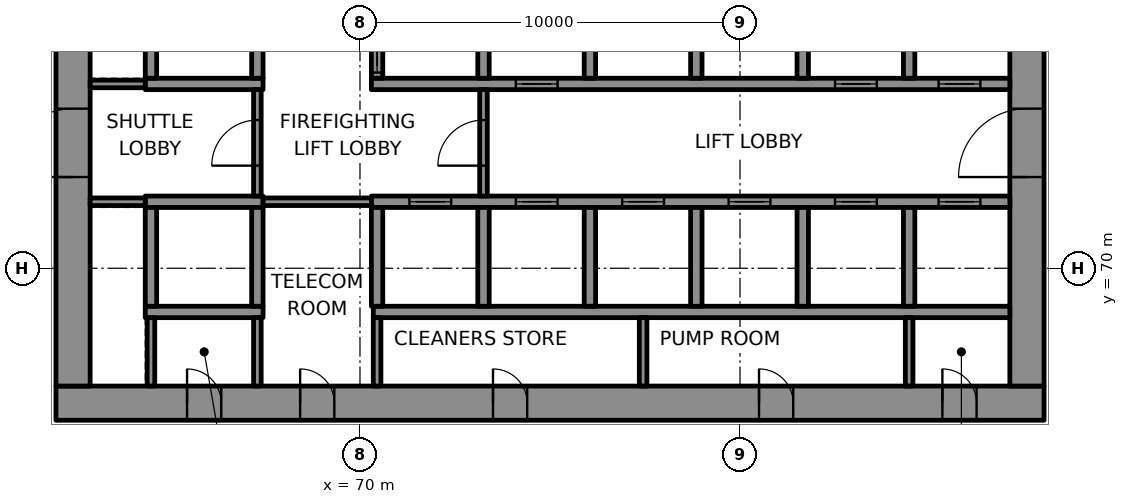
"""IFC4 building model, lengths in metres.
Left out: names, types, materials, properties, quantities, classifications, styles, units other than length and angle.
Written with IfcOpenShell. Run it as: python <this file> out.ifc"""

import sys

from ifc_helpers import new_model, si_unit, direction, frame, frame_2d, origin, place, context, subcontext, project, spatial, rectangle, extrude, element, fill, save


model = new_model("IFC4")
c1 = context("Model", 3, precision=1e-05, world=origin(), true_north=direction((0.0, 1.0)))
c2 = subcontext(c1, "Body", "Model", "MODEL_VIEW")
j1 = project(units=[si_unit("LENGTHUNIT", "METRE"), si_unit("PLANEANGLEUNIT", "RADIAN")], contexts=[c1])
p1 = place(None, origin())
s1 = spatial("IfcSite", under=j1, at=p1, CompositionType="ELEMENT")
p2 = place(p1, origin())
s2 = spatial("IfcBuilding", under=s1, at=p2, CompositionType="ELEMENT")
p3 = place(p2, frame((0.0, 0.0, 103.0)))
s3 = spatial("IfcBuildingStorey", under=s2, at=p3, CompositionType="ELEMENT", Elevation=103.0)
p4 = place(p3, frame((62.0, 66.45, 0.0), z_axis=(0.0, 0.0, 1.0), x_axis=(1.0, 0.0, 0.0)))
e1 = element("IfcWall", 1, at=p4, inside=s3, PredefinedType="SHEAR", context=c2, shape_type="SweptSolid", body=[
    extrude(rectangle(XDim=26.0, YDim=0.9, at=frame_2d((13.0, 0.0))), origin(), (0.0, 0.0, 1.0), 4.0),
])
p5 = place(p4, frame((3.45, 0.0, 0.0)))
e2 = element("IfcOpeningElement", 2, at=p5, cuts=e1, PredefinedType="OPENING", context=c2, shape_type="SweptSolid", body=[
    extrude(rectangle(XDim=0.9, YDim=2.1, at=frame_2d((0.45, 1.05))), frame((0.0, 0.46, 0.0), z_axis=(0.0, -1.0, 0.0), x_axis=(1.0, 0.0, 0.0)), (0.0, 0.0, 1.0), 0.92),
])
p6 = place(p4, frame((6.425, 0.0, 0.0)))
e3 = element("IfcOpeningElement", 3, at=p6, cuts=e1, PredefinedType="OPENING", context=c2, shape_type="SweptSolid", body=[
    extrude(rectangle(XDim=0.9, YDim=2.1, at=frame_2d((0.45, 1.05))), frame((0.0, 0.46, 0.0), z_axis=(0.0, -1.0, 0.0), x_axis=(1.0, 0.0, 0.0)), (0.0, 0.0, 1.0), 0.92),
])
p7 = place(p4, frame((11.5, 0.0, 0.0)))
e4 = element("IfcOpeningElement", 4, at=p7, cuts=e1, PredefinedType="OPENING", context=c2, shape_type="SweptSolid", body=[
    extrude(rectangle(XDim=0.9, YDim=2.1, at=frame_2d((0.45, 1.05))), frame((0.0, 0.46, 0.0), z_axis=(0.0, -1.0, 0.0), x_axis=(1.0, 0.0, 0.0)), (0.0, 0.0, 1.0), 0.92),
])
p8 = place(p4, frame((18.5, 0.0, 0.0)))
e5 = element("IfcOpeningElement", 5, at=p8, cuts=e1, PredefinedType="OPENING", context=c2, shape_type="SweptSolid", body=[
    extrude(rectangle(XDim=0.9, YDim=2.1, at=frame_2d((0.45, 1.05))), frame((0.0, 0.46, 0.0), z_axis=(0.0, -1.0, 0.0), x_axis=(1.0, 0.0, 0.0)), (0.0, 0.0, 1.0), 0.92),
])
p9 = place(p4, frame((23.325, 0.0, 0.0)))
e6 = element("IfcOpeningElement", 6, at=p9, cuts=e1, PredefinedType="OPENING", context=c2, shape_type="SweptSolid", body=[
    extrude(rectangle(XDim=0.9, YDim=2.1, at=frame_2d((0.45, 1.05))), frame((0.0, 0.46, 0.0), z_axis=(0.0, -1.0, 0.0), x_axis=(1.0, 0.0, 0.0)), (0.0, 0.0, 1.0), 0.92),
])
p10 = place(p3, frame((62.45, 66.9, 0.0), z_axis=(0.0, 0.0, 1.0), x_axis=(0.0, 1.0, 0.0)))
e7 = element("IfcWall", 7, at=p10, inside=s3, PredefinedType="SHEAR", context=c2, shape_type="SweptSolid", body=[
    extrude(rectangle(XDim=16.2, YDim=0.9, at=frame_2d((8.1, 0.0))), origin(), (0.0, 0.0, 1.0), 4.0),
])
p11 = place(p10, frame((5.5, 0.0, 0.0)))
e8 = element("IfcOpeningElement", 8, at=p11, cuts=e7, PredefinedType="OPENING", context=c2, shape_type="SweptSolid", body=[
    extrude(rectangle(XDim=1.8, YDim=2.1, at=frame_2d((0.9, 1.05))), frame((0.0, 0.46, 0.0), z_axis=(0.0, -1.0, 0.0), x_axis=(1.0, 0.0, 0.0)), (0.0, 0.0, 1.0), 0.92),
])
p12 = place(p3, frame((87.55, 66.9, 0.0), z_axis=(0.0, 0.0, 1.0), x_axis=(0.0, 1.0, 0.0)))
e9 = element("IfcWall", 9, at=p12, inside=s3, PredefinedType="SHEAR", context=c2, shape_type="SweptSolid", body=[
    extrude(rectangle(XDim=16.2, YDim=0.9, at=frame_2d((8.1, 0.0))), origin(), (0.0, 0.0, 1.0), 4.0),
])
p13 = place(p12, frame((5.5, 0.0, 0.0)))
e10 = element("IfcOpeningElement", 10, at=p13, cuts=e9, PredefinedType="OPENING", context=c2, shape_type="SweptSolid", body=[
    extrude(rectangle(XDim=1.8, YDim=2.1, at=frame_2d((0.9, 1.05))), frame((0.0, 0.46, 0.0), z_axis=(0.0, -1.0, 0.0), x_axis=(1.0, 0.0, 0.0)), (0.0, 0.0, 1.0), 0.92),
])
p14 = place(p12, frame((12.272, 0.0, 0.0)))
e11 = element("IfcOpeningElement", 11, at=p14, cuts=e9, PredefinedType="OPENING", context=c2, shape_type="SweptSolid", body=[
    extrude(rectangle(XDim=0.9, YDim=2.1, at=frame_2d((0.45, 1.05))), frame((0.0, 0.46, 0.0), z_axis=(0.0, -1.0, 0.0), x_axis=(1.0, 0.0, 0.0)), (0.0, 0.0, 1.0), 0.92),
])
p15 = place(p3, frame((64.35, 68.85, 0.0), z_axis=(0.0, 0.0, 1.0), x_axis=(1.0, 0.0, 0.0)))
e12 = element("IfcWall", 12, at=p15, inside=s3, PredefinedType="SHEAR", context=c2, shape_type="SweptSolid", body=[
    extrude(rectangle(XDim=3.1, YDim=0.3, at=frame_2d((1.55, 0.0))), origin(), (0.0, 0.0, 1.0), 4.0),
])
p16 = place(p3, frame((70.35, 68.85, 0.0), z_axis=(0.0, 0.0, 1.0), x_axis=(1.0, 0.0, 0.0)))
e13 = element("IfcWall", 13, at=p16, inside=s3, PredefinedType="SHEAR", context=c2, shape_type="SweptSolid", body=[
    extrude(rectangle(XDim=16.75, YDim=0.3, at=frame_2d((8.375, 0.0))), origin(), (0.0, 0.0, 1.0), 4.0),
])
p17 = place(p3, frame((64.35, 71.75, 0.0), z_axis=(0.0, 0.0, 1.0), x_axis=(1.0, 0.0, 0.0)))
e14 = element("IfcWall", 14, at=p17, inside=s3, PredefinedType="SHEAR", context=c2, shape_type="SweptSolid", body=[
    extrude(rectangle(XDim=3.1, YDim=0.3, at=frame_2d((1.55, 0.0))), origin(), (0.0, 0.0, 1.0), 4.0),
])
p18 = place(p3, frame((70.3, 71.75, 0.0), z_axis=(0.0, 0.0, 1.0), x_axis=(1.0, 0.0, 0.0)))
e15 = element("IfcWall", 15, at=p18, inside=s3, PredefinedType="SHEAR", context=c2, shape_type="SweptSolid", body=[
    extrude(rectangle(XDim=16.8, YDim=0.3, at=frame_2d((8.4, 0.0))), origin(), (0.0, 0.0, 1.0), 4.0),
])
p19 = place(p18, frame((1.0, 0.0, 0.0)))
e16 = element("IfcOpeningElement", 16, at=p19, cuts=e15, PredefinedType="OPENING", context=c2, shape_type="SweptSolid", body=[
    extrude(rectangle(XDim=1.1, YDim=2.1, at=frame_2d((0.55, 1.05))), frame((0.0, 0.16, 0.0), z_axis=(0.0, -1.0, 0.0), x_axis=(1.0, 0.0, 0.0)), (0.0, 0.0, 1.0), 0.32),
])
p20 = place(p18, frame((3.8, 0.0, 0.0)))
e17 = element("IfcOpeningElement", 17, at=p20, cuts=e15, PredefinedType="OPENING", context=c2, shape_type="SweptSolid", body=[
    extrude(rectangle(XDim=1.1, YDim=2.1, at=frame_2d((0.55, 1.05))), frame((0.0, 0.16, 0.0), z_axis=(0.0, -1.0, 0.0), x_axis=(1.0, 0.0, 0.0)), (0.0, 0.0, 1.0), 0.32),
])
p21 = place(p18, frame((6.6, 0.0, 0.0)))
e18 = element("IfcOpeningElement", 18, at=p21, cuts=e15, PredefinedType="OPENING", context=c2, shape_type="SweptSolid", body=[
    extrude(rectangle(XDim=1.1, YDim=2.1, at=frame_2d((0.55, 1.05))), frame((0.0, 0.16, 0.0), z_axis=(0.0, -1.0, 0.0), x_axis=(1.0, 0.0, 0.0)), (0.0, 0.0, 1.0), 0.32),
])
p22 = place(p18, frame((9.4, 0.0, 0.0)))
e19 = element("IfcOpeningElement", 19, at=p22, cuts=e15, PredefinedType="OPENING", context=c2, shape_type="SweptSolid", body=[
    extrude(rectangle(XDim=1.1, YDim=2.1, at=frame_2d((0.55, 1.05))), frame((0.0, 0.16, 0.0), z_axis=(0.0, -1.0, 0.0), x_axis=(1.0, 0.0, 0.0)), (0.0, 0.0, 1.0), 0.32),
])
p23 = place(p18, frame((12.2, 0.0, 0.0)))
e20 = element("IfcOpeningElement", 20, at=p23, cuts=e15, PredefinedType="OPENING", context=c2, shape_type="SweptSolid", body=[
    extrude(rectangle(XDim=1.1, YDim=2.1, at=frame_2d((0.55, 1.05))), frame((0.0, 0.16, 0.0), z_axis=(0.0, -1.0, 0.0), x_axis=(1.0, 0.0, 0.0)), (0.0, 0.0, 1.0), 0.32),
])
p24 = place(p18, frame((14.925, 0.0, 0.0)))
e21 = element("IfcOpeningElement", 21, at=p24, cuts=e15, PredefinedType="OPENING", context=c2, shape_type="SweptSolid", body=[
    extrude(rectangle(XDim=1.1, YDim=2.1, at=frame_2d((0.55, 1.05))), frame((0.0, 0.16, 0.0), z_axis=(0.0, -1.0, 0.0), x_axis=(1.0, 0.0, 0.0)), (0.0, 0.0, 1.0), 0.32),
])
p25 = place(p3, frame((64.35, 74.85, 0.0), z_axis=(0.0, 0.0, 1.0), x_axis=(1.0, 0.0, 0.0)))
e22 = element("IfcWall", 22, at=p25, inside=s3, PredefinedType="SHEAR", context=c2, shape_type="SweptSolid", body=[
    extrude(rectangle(XDim=3.1, YDim=0.3, at=frame_2d((1.55, 0.0))), origin(), (0.0, 0.0, 1.0), 4.0),
])
p26 = place(p3, frame((70.3, 74.85, 0.0), z_axis=(0.0, 0.0, 1.0), x_axis=(1.0, 0.0, 0.0)))
e23 = element("IfcWall", 23, at=p26, inside=s3, PredefinedType="SHEAR", context=c2, shape_type="SweptSolid", body=[
    extrude(rectangle(XDim=16.8, YDim=0.3, at=frame_2d((8.4, 0.0))), origin(), (0.0, 0.0, 1.0), 4.0),
])
p27 = place(p26, frame((3.8, 0.0, 0.0)))
e24 = element("IfcOpeningElement", 24, at=p27, cuts=e23, PredefinedType="OPENING", context=c2, shape_type="SweptSolid", body=[
    extrude(rectangle(XDim=1.1, YDim=2.1, at=frame_2d((0.55, 1.05))), frame((0.0, 0.16, 0.0), z_axis=(0.0, -1.0, 0.0), x_axis=(1.0, 0.0, 0.0)), (0.0, 0.0, 1.0), 0.32),
])
p28 = place(p26, frame((12.2, 0.0, 0.0)))
e25 = element("IfcOpeningElement", 25, at=p28, cuts=e23, PredefinedType="OPENING", context=c2, shape_type="SweptSolid", body=[
    extrude(rectangle(XDim=1.1, YDim=2.1, at=frame_2d((0.55, 1.05))), frame((0.0, 0.16, 0.0), z_axis=(0.0, -1.0, 0.0), x_axis=(1.0, 0.0, 0.0)), (0.0, 0.0, 1.0), 0.32),
])
p29 = place(p26, frame((14.925, 0.0, 0.0)))
e26 = element("IfcOpeningElement", 26, at=p29, cuts=e23, PredefinedType="OPENING", context=c2, shape_type="SweptSolid", body=[
    extrude(rectangle(XDim=1.1, YDim=2.1, at=frame_2d((0.55, 1.05))), frame((0.0, 0.16, 0.0), z_axis=(0.0, -1.0, 0.0), x_axis=(1.0, 0.0, 0.0)), (0.0, 0.0, 1.0), 0.32),
])
for number, where, z_axis, x_axis in (
    (27, (64.5, 69.0, 0.0), (0.0, 0.0, 1.0), (0.0, 1.0, 0.0)),
    (28, (64.5, 75.0, 0.0), (0.0, 0.0, 1.0), (0.0, 1.0, 0.0)),
    (29, (67.3, 69.0, 0.0), (0.0, 0.0, 1.0), (0.0, 1.0, 0.0)),
    (30, (67.3, 75.0, 0.0), (0.0, 0.0, 1.0), (0.0, 1.0, 0.0)),
    (31, (70.45, 69.0, 0.0), (0.0, 0.0, 1.0), (0.0, 1.0, 0.0)),
):
    element("IfcWall", number, at=place(p3, frame(where, z_axis=z_axis, x_axis=x_axis)), inside=s3, PredefinedType="SHEAR", context=c2, shape_type="SweptSolid", body=[
        extrude(rectangle(XDim=2.6, YDim=0.3, at=frame_2d((1.3, 0.0))), origin(), (0.0, 0.0, 1.0), 4.0),
    ])
p30 = place(p3, frame((70.45, 75.0, 0.0), z_axis=(0.0, 0.0, 1.0), x_axis=(0.0, 1.0, 0.0)))
e32 = element("IfcWall", 32, at=p30, inside=s3, PredefinedType="SHEAR", context=c2, shape_type="SweptSolid", body=[
    extrude(rectangle(XDim=2.6, YDim=0.3, at=frame_2d((1.3, 0.0))), origin(), (0.0, 0.0, 1.0), 4.0),
])
p31 = place(p30, frame((0.15, 0.0, 0.0)))
e33 = element("IfcOpeningElement", 33, at=p31, cuts=e32, PredefinedType="OPENING", context=c2, shape_type="SweptSolid", body=[
    extrude(rectangle(XDim=1.1, YDim=2.1, at=frame_2d((0.55, 1.05))), frame((0.0, 0.16, 0.0), z_axis=(0.0, -1.0, 0.0), x_axis=(1.0, 0.0, 0.0)), (0.0, 0.0, 1.0), 0.32),
])
for number, where, z_axis, x_axis in (
    (34, (73.25, 69.0, 0.0), (0.0, 0.0, 1.0), (0.0, 1.0, 0.0)),
    (35, (73.25, 75.0, 0.0), (0.0, 0.0, 1.0), (0.0, 1.0, 0.0)),
    (36, (76.05, 69.0, 0.0), (0.0, 0.0, 1.0), (0.0, 1.0, 0.0)),
    (37, (76.05, 75.0, 0.0), (0.0, 0.0, 1.0), (0.0, 1.0, 0.0)),
    (38, (78.85, 69.0, 0.0), (0.0, 0.0, 1.0), (0.0, 1.0, 0.0)),
    (39, (78.85, 75.0, 0.0), (0.0, 0.0, 1.0), (0.0, 1.0, 0.0)),
    (40, (81.65, 69.0, 0.0), (0.0, 0.0, 1.0), (0.0, 1.0, 0.0)),
    (41, (81.65, 75.0, 0.0), (0.0, 0.0, 1.0), (0.0, 1.0, 0.0)),
    (42, (84.45, 69.0, 0.0), (0.0, 0.0, 1.0), (0.0, 1.0, 0.0)),
    (43, (84.45, 75.0, 0.0), (0.0, 0.0, 1.0), (0.0, 1.0, 0.0)),
):
    element("IfcWall", number, at=place(p3, frame(where, z_axis=z_axis, x_axis=x_axis)), inside=s3, PredefinedType="SHEAR", context=c2, shape_type="SweptSolid", body=[
        extrude(rectangle(XDim=2.6, YDim=0.3, at=frame_2d((1.3, 0.0))), origin(), (0.0, 0.0, 1.0), 4.0),
    ])
p32 = place(p3, frame((62.9, 71.75, 0.0), z_axis=(0.0, 0.0, 1.0), x_axis=(1.0, 0.0, 0.0)))
e44 = element("IfcWall", 44, at=p32, inside=s3, PredefinedType="PARTITIONING", context=c2, shape_type="SweptSolid", body=[
    extrude(rectangle(XDim=1.45, YDim=0.2, at=frame_2d((0.725, 0.0))), origin(), (0.0, 0.0, 1.0), 4.0),
])
p33 = place(p3, frame((67.45, 71.75, 0.0), z_axis=(0.0, 0.0, 1.0), x_axis=(1.0, 0.0, 0.0)))
e45 = element("IfcWall", 45, at=p33, inside=s3, PredefinedType="PARTITIONING", context=c2, shape_type="SweptSolid", body=[
    extrude(rectangle(XDim=2.85, YDim=0.2, at=frame_2d((1.425, 0.0))), origin(), (0.0, 0.0, 1.0), 4.0),
])
p34 = place(p3, frame((62.9, 74.85, 0.0), z_axis=(0.0, 0.0, 1.0), x_axis=(1.0, 0.0, 0.0)))
e46 = element("IfcWall", 46, at=p34, inside=s3, PredefinedType="PARTITIONING", context=c2, shape_type="SweptSolid", body=[
    extrude(rectangle(XDim=1.45, YDim=0.2, at=frame_2d((0.725, 0.0))), origin(), (0.0, 0.0, 1.0), 4.0),
])
for number, where, z_axis, x_axis in (
    (47, (64.5, 66.9, 0.0), (0.0, 0.0, 1.0), (0.0, 1.0, 0.0)),
    (48, (67.3, 66.9, 0.0), (0.0, 0.0, 1.0), (0.0, 1.0, 0.0)),
):
    element("IfcWall", number, at=place(p3, frame(where, z_axis=z_axis, x_axis=x_axis)), inside=s3, PredefinedType="PARTITIONING", context=c2, shape_type="SweptSolid", body=[
        extrude(rectangle(XDim=1.8, YDim=0.2, at=frame_2d((0.9, 0.0))), origin(), (0.0, 0.0, 1.0), 4.0),
    ])
p35 = place(p3, frame((67.3, 71.9, 0.0), z_axis=(0.0, 0.0, 1.0), x_axis=(0.0, 1.0, 0.0)))
e49 = element("IfcWall", 49, at=p35, inside=s3, PredefinedType="PARTITIONING", context=c2, shape_type="SweptSolid", body=[
    extrude(rectangle(XDim=2.8, YDim=0.2, at=frame_2d((1.4, 0.0))), origin(), (0.0, 0.0, 1.0), 4.0),
])
p36 = place(p35, frame((0.8, 0.0, 0.0)))
e50 = element("IfcOpeningElement", 50, at=p36, cuts=e49, PredefinedType="OPENING", context=c2, shape_type="SweptSolid", body=[
    extrude(rectangle(XDim=1.2, YDim=2.1, at=frame_2d((0.6, 1.05))), frame((0.0, 0.11, 0.0), z_axis=(0.0, -1.0, 0.0), x_axis=(1.0, 0.0, 0.0)), (0.0, 0.0, 1.0), 0.22),
])
p37 = place(p3, frame((70.45, 66.9, 0.0), z_axis=(0.0, 0.0, 1.0), x_axis=(0.0, 1.0, 0.0)))
e51 = element("IfcWall", 51, at=p37, inside=s3, PredefinedType="PARTITIONING", context=c2, shape_type="SweptSolid", body=[
    extrude(rectangle(XDim=1.8, YDim=0.2, at=frame_2d((0.9, 0.0))), origin(), (0.0, 0.0, 1.0), 4.0),
])
p38 = place(p3, frame((73.25, 71.9, 0.0), z_axis=(0.0, 0.0, 1.0), x_axis=(0.0, 1.0, 0.0)))
e52 = element("IfcWall", 52, at=p38, inside=s3, PredefinedType="PARTITIONING", context=c2, shape_type="SweptSolid", body=[
    extrude(rectangle(XDim=2.8, YDim=0.2, at=frame_2d((1.4, 0.0))), origin(), (0.0, 0.0, 1.0), 4.0),
])
p39 = place(p38, frame((0.8, 0.0, 0.0)))
e53 = element("IfcOpeningElement", 53, at=p39, cuts=e52, PredefinedType="OPENING", context=c2, shape_type="SweptSolid", body=[
    extrude(rectangle(XDim=1.2, YDim=2.1, at=frame_2d((0.6, 1.05))), frame((0.0, 0.11, 0.0), z_axis=(0.0, -1.0, 0.0), x_axis=(1.0, 0.0, 0.0)), (0.0, 0.0, 1.0), 0.22),
])
for number, where, z_axis, x_axis in (
    (54, (77.45, 66.9, 0.0), (0.0, 0.0, 1.0), (0.0, 1.0, 0.0)),
    (55, (84.45, 66.9, 0.0), (0.0, 0.0, 1.0), (0.0, 1.0, 0.0)),
):
    element("IfcWall", number, at=place(p3, frame(where, z_axis=z_axis, x_axis=x_axis)), inside=s3, PredefinedType="PARTITIONING", context=c2, shape_type="SweptSolid", body=[
        extrude(rectangle(XDim=1.8, YDim=0.2, at=frame_2d((0.9, 0.0))), origin(), (0.0, 0.0, 1.0), 4.0),
    ])
p40 = place(p19, origin())
e56 = element("IfcDoor", 56, at=p40, inside=s3, OperationType="DOUBLE_DOOR_SLIDING", PredefinedType="DOOR", context=c2, shape_type="SweptSolid", body=[
    extrude(rectangle(XDim=1.1, YDim=2.1, at=frame_2d((0.55, 1.05))), frame((0.0, 0.025, 0.0), z_axis=(0.0, -1.0, 0.0), x_axis=(1.0, 0.0, 0.0)), (0.0, 0.0, 1.0), 0.05),
])
fill(e16, e56)
p41 = place(p20, origin())
e57 = element("IfcDoor", 57, at=p41, inside=s3, OperationType="DOUBLE_DOOR_SLIDING", PredefinedType="DOOR", context=c2, shape_type="SweptSolid", body=[
    extrude(rectangle(XDim=1.1, YDim=2.1, at=frame_2d((0.55, 1.05))), frame((0.0, 0.025, 0.0), z_axis=(0.0, -1.0, 0.0), x_axis=(1.0, 0.0, 0.0)), (0.0, 0.0, 1.0), 0.05),
])
fill(e17, e57)
p42 = place(p21, origin())
e58 = element("IfcDoor", 58, at=p42, inside=s3, OperationType="DOUBLE_DOOR_SLIDING", PredefinedType="DOOR", context=c2, shape_type="SweptSolid", body=[
    extrude(rectangle(XDim=1.1, YDim=2.1, at=frame_2d((0.55, 1.05))), frame((0.0, 0.025, 0.0), z_axis=(0.0, -1.0, 0.0), x_axis=(1.0, 0.0, 0.0)), (0.0, 0.0, 1.0), 0.05),
])
fill(e18, e58)
p43 = place(p22, origin())
e59 = element("IfcDoor", 59, at=p43, inside=s3, OperationType="DOUBLE_DOOR_SLIDING", PredefinedType="DOOR", context=c2, shape_type="SweptSolid", body=[
    extrude(rectangle(XDim=1.1, YDim=2.1, at=frame_2d((0.55, 1.05))), frame((0.0, 0.025, 0.0), z_axis=(0.0, -1.0, 0.0), x_axis=(1.0, 0.0, 0.0)), (0.0, 0.0, 1.0), 0.05),
])
fill(e19, e59)
p44 = place(p23, origin())
e60 = element("IfcDoor", 60, at=p44, inside=s3, OperationType="DOUBLE_DOOR_SLIDING", PredefinedType="DOOR", context=c2, shape_type="SweptSolid", body=[
    extrude(rectangle(XDim=1.1, YDim=2.1, at=frame_2d((0.55, 1.05))), frame((0.0, 0.025, 0.0), z_axis=(0.0, -1.0, 0.0), x_axis=(1.0, 0.0, 0.0)), (0.0, 0.0, 1.0), 0.05),
])
fill(e20, e60)
p45 = place(p24, origin())
e61 = element("IfcDoor", 61, at=p45, inside=s3, OperationType="DOUBLE_DOOR_SLIDING", PredefinedType="DOOR", context=c2, shape_type="SweptSolid", body=[
    extrude(rectangle(XDim=1.1, YDim=2.1, at=frame_2d((0.55, 1.05))), frame((0.0, 0.025, 0.0), z_axis=(0.0, -1.0, 0.0), x_axis=(1.0, 0.0, 0.0)), (0.0, 0.0, 1.0), 0.05),
])
fill(e21, e61)
p46 = place(p31, origin())
e62 = element("IfcDoor", 62, at=p46, inside=s3, OperationType="DOUBLE_DOOR_SLIDING", PredefinedType="DOOR", context=c2, shape_type="SweptSolid", body=[
    extrude(rectangle(XDim=1.1, YDim=2.1, at=frame_2d((0.55, 1.05))), frame((0.0, 0.025, 0.0), z_axis=(0.0, -1.0, 0.0), x_axis=(1.0, 0.0, 0.0)), (0.0, 0.0, 1.0), 0.05),
])
fill(e33, e62)
p47 = place(p27, origin())
e63 = element("IfcDoor", 63, at=p47, inside=s3, OperationType="DOUBLE_DOOR_SLIDING", PredefinedType="DOOR", context=c2, shape_type="SweptSolid", body=[
    extrude(rectangle(XDim=1.1, YDim=2.1, at=frame_2d((0.55, 1.05))), frame((0.0, 0.025, 0.0), z_axis=(0.0, -1.0, 0.0), x_axis=(1.0, 0.0, 0.0)), (0.0, 0.0, 1.0), 0.05),
])
fill(e24, e63)
p48 = place(p28, origin())
e64 = element("IfcDoor", 64, at=p48, inside=s3, OperationType="DOUBLE_DOOR_SLIDING", PredefinedType="DOOR", context=c2, shape_type="SweptSolid", body=[
    extrude(rectangle(XDim=1.1, YDim=2.1, at=frame_2d((0.55, 1.05))), frame((0.0, 0.025, 0.0), z_axis=(0.0, -1.0, 0.0), x_axis=(1.0, 0.0, 0.0)), (0.0, 0.0, 1.0), 0.05),
])
fill(e25, e64)
p49 = place(p29, origin())
e65 = element("IfcDoor", 65, at=p49, inside=s3, OperationType="DOUBLE_DOOR_SLIDING", PredefinedType="DOOR", context=c2, shape_type="SweptSolid", body=[
    extrude(rectangle(XDim=1.1, YDim=2.1, at=frame_2d((0.55, 1.05))), frame((0.0, 0.025, 0.0), z_axis=(0.0, -1.0, 0.0), x_axis=(1.0, 0.0, 0.0)), (0.0, 0.0, 1.0), 0.05),
])
fill(e26, e65)
p50 = place(p39, origin())
e66 = element("IfcDoor", 66, at=p50, inside=s3, OperationType="SINGLE_SWING_LEFT", PredefinedType="DOOR", context=c2, shape_type="SweptSolid", body=[
    extrude(rectangle(XDim=1.2, YDim=2.1, at=frame_2d((0.6, 1.05))), frame((0.0, 0.025, 0.0), z_axis=(0.0, -1.0, 0.0), x_axis=(1.0, 0.0, 0.0)), (0.0, 0.0, 1.0), 0.05),
])
fill(e53, e66)
p51 = place(p36, origin())
e67 = element("IfcDoor", 67, at=p51, inside=s3, OperationType="SINGLE_SWING_RIGHT", PredefinedType="DOOR", context=c2, shape_type="SweptSolid", body=[
    extrude(rectangle(XDim=1.2, YDim=2.1, at=frame_2d((0.6, 1.05))), frame((0.0, 0.025, 0.0), z_axis=(0.0, -1.0, 0.0), x_axis=(1.0, 0.0, 0.0)), (0.0, 0.0, 1.0), 0.05),
])
fill(e50, e67)
p52 = place(p11, origin())
e68 = element("IfcDoor", 68, at=p52, inside=s3, OperationType="SINGLE_SWING_LEFT", PredefinedType="DOOR", context=c2, shape_type="SweptSolid", body=[
    extrude(rectangle(XDim=1.8, YDim=2.1, at=frame_2d((0.9, 1.05))), frame((0.0, 0.17, 0.0), z_axis=(0.0, -1.0, 0.0), x_axis=(1.0, 0.0, 0.0)), (0.0, 0.0, 1.0), 0.34),
])
fill(e8, e68)
p53 = place(p13, origin())
e69 = element("IfcDoor", 69, at=p53, inside=s3, OperationType="SINGLE_SWING_RIGHT", PredefinedType="DOOR", context=c2, shape_type="SweptSolid", body=[
    extrude(rectangle(XDim=1.8, YDim=2.1, at=frame_2d((0.9, 1.05))), frame((0.0, 0.17, 0.0), z_axis=(0.0, -1.0, 0.0), x_axis=(1.0, 0.0, 0.0)), (0.0, 0.0, 1.0), 0.34),
])
fill(e10, e69)
p54 = place(p5, origin())
e70 = element("IfcDoor", 70, at=p54, inside=s3, OperationType="SINGLE_SWING_LEFT", PredefinedType="DOOR", context=c2, shape_type="SweptSolid", body=[
    extrude(rectangle(XDim=0.9, YDim=2.1, at=frame_2d((0.45, 1.05))), frame((0.0, 0.17, 0.0), z_axis=(0.0, -1.0, 0.0), x_axis=(1.0, 0.0, 0.0)), (0.0, 0.0, 1.0), 0.34),
])
fill(e2, e70)
p55 = place(p6, origin())
e71 = element("IfcDoor", 71, at=p55, inside=s3, OperationType="SINGLE_SWING_RIGHT", PredefinedType="DOOR", context=c2, shape_type="SweptSolid", body=[
    extrude(rectangle(XDim=0.9, YDim=2.1, at=frame_2d((0.45, 1.05))), frame((0.0, 0.17, 0.0), z_axis=(0.0, -1.0, 0.0), x_axis=(1.0, 0.0, 0.0)), (0.0, 0.0, 1.0), 0.34),
])
fill(e3, e71)
p56 = place(p7, origin())
e72 = element("IfcDoor", 72, at=p56, inside=s3, OperationType="SINGLE_SWING_LEFT", PredefinedType="DOOR", context=c2, shape_type="SweptSolid", body=[
    extrude(rectangle(XDim=0.9, YDim=2.1, at=frame_2d((0.45, 1.05))), frame((0.0, 0.17, 0.0), z_axis=(0.0, -1.0, 0.0), x_axis=(1.0, 0.0, 0.0)), (0.0, 0.0, 1.0), 0.34),
])
fill(e4, e72)
p57 = place(p8, origin())
e73 = element("IfcDoor", 73, at=p57, inside=s3, OperationType="SINGLE_SWING_RIGHT", PredefinedType="DOOR", context=c2, shape_type="SweptSolid", body=[
    extrude(rectangle(XDim=0.9, YDim=2.1, at=frame_2d((0.45, 1.05))), frame((0.0, 0.17, 0.0), z_axis=(0.0, -1.0, 0.0), x_axis=(1.0, 0.0, 0.0)), (0.0, 0.0, 1.0), 0.34),
])
fill(e5, e73)
p58 = place(p9, origin())
e74 = element("IfcDoor", 74, at=p58, inside=s3, OperationType="SINGLE_SWING_LEFT", PredefinedType="DOOR", context=c2, shape_type="SweptSolid", body=[
    extrude(rectangle(XDim=0.9, YDim=2.1, at=frame_2d((0.45, 1.05))), frame((0.0, 0.17, 0.0), z_axis=(0.0, -1.0, 0.0), x_axis=(1.0, 0.0, 0.0)), (0.0, 0.0, 1.0), 0.34),
])
fill(e6, e74)
save(model, sys.argv[1])
